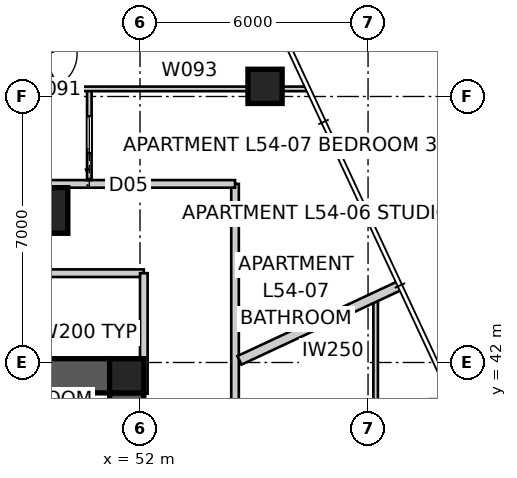
"""IFC4 building model, lengths in metres.
Left out: names, types, materials, properties, quantities, classifications, styles, units other than length and angle.
Written with IfcOpenShell. Run it as: python <this file> out.ifc"""

import sys

from ifc_helpers import new_model, si_unit, direction, frame, frame_2d, origin, origin_2d, place, context, subcontext, project, spatial, polyline, rectangle, outline, extrude, element, fill, save


model = new_model("IFC4")
c1 = context("Model", 3, precision=1e-05, world=origin(), true_north=direction((0.0, 1.0)))
c2 = subcontext(c1, "Body", "Model", "MODEL_VIEW")
j1 = project(units=[si_unit("LENGTHUNIT", "METRE"), si_unit("PLANEANGLEUNIT", "RADIAN")], contexts=[c1])
p1 = place(None, origin())
s1 = spatial("IfcSite", under=j1, at=p1, CompositionType="ELEMENT")
p2 = place(p1, origin())
s2 = spatial("IfcBuilding", under=s1, at=p2, CompositionType="ELEMENT")
p3 = place(p2, frame((0.0, 0.0, 196.4)))
s3 = spatial("IfcBuildingStorey", under=s2, at=p3, CompositionType="ELEMENT", Elevation=196.4)
p4 = place(p3, frame((28.8, 41.65, 0.0), z_axis=(0.0, 0.0, 1.0), x_axis=(1.0, 0.0, 0.0)))
e1 = element("IfcWall", 1, at=p4, inside=s3, PredefinedType="SHEAR", context=c2, shape_type="SweptSolid", body=[
    extrude(outline(polyline([(0.0, -0.45), (22.4, -0.45), (22.4, -0.025), (22.85, -0.025), (22.85, 0.025), (22.4, 0.025), (22.4, 0.45), (0.0, 0.45), (0.0, 0.025), (-0.45, 0.025), (-0.45, -0.025), (0.0, -0.025), (0.0, -0.45)])), origin(), (0.0, 0.0, 1.0), 3.4),
])
p5 = place(p3, frame((51.65, 18.8, 0.0), z_axis=(0.0, 0.0, 1.0), x_axis=(0.0, 1.0, 0.0)))
e2 = element("IfcWall", 2, at=p5, inside=s3, PredefinedType="SHEAR", context=c2, shape_type="SweptSolid", body=[
    extrude(outline(polyline([(0.0, -0.45), (22.4, -0.45), (22.4, -0.025), (22.85, -0.025), (22.85, 0.025), (22.4, 0.025), (22.4, 0.45), (0.0, 0.45), (0.0, 0.025), (-0.45, 0.025), (-0.45, -0.025), (0.0, -0.025), (0.0, -0.45)])), origin(), (0.0, 0.0, 1.0), 3.4),
])
p6 = place(p5, frame((11.14, 0.0, 0.0)))
e3 = element("IfcOpeningElement", 3, at=p6, cuts=e2, PredefinedType="OPENING", context=c2, shape_type="SweptSolid", body=[
    extrude(rectangle(XDim=1.02, YDim=2.4, at=frame_2d((0.51, 1.2))), frame((0.0, 0.46, 0.0), z_axis=(0.0, -1.0, 0.0), x_axis=(1.0, 0.0, 0.0)), (0.0, 0.0, 1.0), 0.92),
])
for number, where, z_axis, x_axis in (
    (4, (51.65, 41.65, 0.0), (0.0, 0.0, 1.0), (1.0, 0.0, 0.0)),
    (5, (55.29, 49.267, 0.0), (0.0, 0.0, 1.0), (1.0, 0.0, 0.0)),
):
    element("IfcColumn", number, at=place(p3, frame(where, z_axis=z_axis, x_axis=x_axis)), inside=s3, PredefinedType="COLUMN", context=c2, shape_type="SweptSolid", body=[
        extrude(rectangle(XDim=0.9, YDim=0.9, at=origin_2d()), origin(), (0.0, 0.0, 1.0), 3.4),
    ])
p7 = place(p3, frame((49.5, 46.0, 0.0), z_axis=(0.0, 0.0, 1.0), x_axis=(1.0, 0.0, 0.0)))
e6 = element("IfcColumn", 6, at=p7, inside=s3, PredefinedType="COLUMN", context=c2, shape_type="SweptSolid", body=[
    extrude(rectangle(XDim=1.2, YDim=1.2, at=origin_2d()), origin(), (0.0, 0.0, 1.0), 3.4),
])
p8 = place(p3, frame((54.5, 12.9, 0.0), z_axis=(0.0, 0.0, 1.0), x_axis=(0.0, 1.0, 0.0)))
e7 = element("IfcWall", 7, at=p8, inside=s3, PredefinedType="PARTITIONING", context=c2, shape_type="SweptSolid", body=[
    extrude(rectangle(XDim=33.8, YDim=0.2, at=frame_2d((16.9, 0.0))), origin(), (0.0, 0.0, 1.0), 3.25),
])
p9 = place(p8, frame((24.911, 0.0, 0.0)))
e8 = element("IfcOpeningElement", 8, at=p9, cuts=e7, PredefinedType="OPENING", context=c2, shape_type="SweptSolid", body=[
    extrude(rectangle(XDim=1.02, YDim=2.34, at=frame_2d((0.51, 1.17))), frame((0.0, 0.11, 0.0), z_axis=(0.0, -1.0, 0.0), x_axis=(1.0, 0.0, 0.0)), (0.0, 0.0, 1.0), 0.22),
])
p10 = place(p8, frame((14.759, 0.0, 0.0)))
e9 = element("IfcOpeningElement", 9, at=p10, cuts=e7, PredefinedType="OPENING", context=c2, shape_type="SweptSolid", body=[
    extrude(rectangle(XDim=1.02, YDim=2.34, at=frame_2d((0.51, 1.17))), frame((0.0, 0.11, 0.0), z_axis=(0.0, -1.0, 0.0), x_axis=(1.0, 0.0, 0.0)), (0.0, 0.0, 1.0), 0.22),
])
p11 = place(p3, frame((54.5, 46.7, 0.0), z_axis=(0.0, 0.0, 1.0), x_axis=(-1.0, 0.0, 0.0)))
e10 = element("IfcWall", 10, at=p11, inside=s3, PredefinedType="PARTITIONING", context=c2, shape_type="SweptSolid", body=[
    extrude(rectangle(XDim=6.725, YDim=0.2, at=frame_2d((3.362, 0.0))), origin(), (0.0, 0.0, 1.0), 3.25),
])
p12 = place(p3, frame((58.838, 44.025, 0.0), z_axis=(0.0, 0.0, 1.0), x_axis=(-0.906317010604, -0.422598481173, 0.0)))
e11 = element("IfcWall", 11, at=p12, inside=s3, PredefinedType="PARTITIONING", context=c2, shape_type="SweptSolid", body=[
    extrude(rectangle(XDim=4.657, YDim=0.25, at=frame_2d((2.329, 0.0))), origin(), (0.0, 0.0, 1.0), 3.25),
])
p13 = place(p3, frame((52.1, 44.35, 0.0), z_axis=(0.0, 0.0, 1.0), x_axis=(-1.0, 0.0, 0.0)))
e12 = element("IfcWall", 12, at=p13, inside=s3, PredefinedType="PARTITIONING", context=c2, shape_type="SweptSolid", body=[
    extrude(rectangle(XDim=24.2, YDim=0.2, at=frame_2d((12.1, 0.0))), origin(), (0.0, 0.0, 1.0), 3.25),
])
p14 = place(p13, frame((10.743, 0.0, 0.0)))
e13 = element("IfcOpeningElement", 13, at=p14, cuts=e12, PredefinedType="OPENING", context=c2, shape_type="SweptSolid", body=[
    extrude(rectangle(XDim=1.02, YDim=2.1, at=frame_2d((0.51, 1.05))), frame((0.0, 0.11, 0.0), z_axis=(0.0, -1.0, 0.0), x_axis=(1.0, 0.0, 0.0)), (0.0, 0.0, 1.0), 0.22),
])
p15 = place(p13, frame((19.636, 0.0, 0.0)))
e14 = element("IfcOpeningElement", 14, at=p15, cuts=e12, PredefinedType="OPENING", context=c2, shape_type="SweptSolid", body=[
    extrude(rectangle(XDim=1.02, YDim=2.1, at=frame_2d((0.51, 1.05))), frame((0.0, 0.11, 0.0), z_axis=(0.0, -1.0, 0.0), x_axis=(1.0, 0.0, 0.0)), (0.0, 0.0, 1.0), 0.22),
])
p16 = place(p13, frame((3.297, 0.0, 0.0)))
e15 = element("IfcOpeningElement", 15, at=p16, cuts=e12, PredefinedType="OPENING", context=c2, shape_type="SweptSolid", body=[
    extrude(rectangle(XDim=1.02, YDim=2.1, at=frame_2d((0.51, 1.05))), frame((0.0, 0.11, 0.0), z_axis=(0.0, -1.0, 0.0), x_axis=(1.0, 0.0, 0.0)), (0.0, 0.0, 1.0), 0.22),
])
p17 = place(p3, frame((52.1, 41.18, 0.0), z_axis=(0.0, 0.0, 1.0), x_axis=(0.0, 1.0, 0.0)))
e16 = element("IfcWall", 16, at=p17, inside=s3, PredefinedType="PARTITIONING", context=c2, shape_type="SweptSolid", body=[
    extrude(rectangle(XDim=3.17, YDim=0.2, at=frame_2d((1.585, 0.0))), origin(), (0.0, 0.0, 1.0), 3.25),
])
p18 = place(p3, frame((58.2, 43.728, 0.0), z_axis=(0.0, 0.0, 1.0), x_axis=(0.0, -1.0, 0.0)))
e17 = element("IfcWall", 17, at=p18, inside=s3, PredefinedType="PARTITIONING", context=c2, shape_type="SweptSolid", body=[
    extrude(rectangle(XDim=16.528, YDim=0.12, at=frame_2d((8.264, 0.0))), origin(), (0.0, 0.0, 1.0), 3.25),
])
p19 = place(p18, frame((4.954, 0.0, 0.0)))
e18 = element("IfcOpeningElement", 18, at=p19, cuts=e17, PredefinedType="OPENING", context=c2, shape_type="SweptSolid", body=[
    extrude(rectangle(XDim=0.92, YDim=2.34, at=frame_2d((0.46, 1.17))), frame((0.0, 0.07, 0.0), z_axis=(0.0, -1.0, 0.0), x_axis=(1.0, 0.0, 0.0)), (0.0, 0.0, 1.0), 0.14),
])
p20 = place(p18, frame((14.2, 0.0, 0.0)))
e19 = element("IfcOpeningElement", 19, at=p20, cuts=e17, PredefinedType="OPENING", context=c2, shape_type="SweptSolid", body=[
    extrude(rectangle(XDim=0.92, YDim=2.34, at=frame_2d((0.46, 1.17))), frame((0.0, 0.07, 0.0), z_axis=(0.0, -1.0, 0.0), x_axis=(1.0, 0.0, 0.0)), (0.0, 0.0, 1.0), 0.14),
])
p21 = place(p3, frame((50.666, 46.8, 0.0), z_axis=(0.0, 0.0, 1.0), x_axis=(0.0, 1.0, 0.0)))
e20 = element("IfcWall", 20, at=p21, inside=s3, PredefinedType="PARTITIONING", context=c2, shape_type="SweptSolid", body=[
    extrude(rectangle(XDim=2.4, YDim=0.12, at=frame_2d((1.2, 0.0))), origin(), (0.0, 0.0, 1.0), 3.25),
])
p22 = place(p21, frame((0.72, 0.0, 0.0)))
e21 = element("IfcOpeningElement", 21, at=p22, cuts=e20, PredefinedType="OPENING", context=c2, shape_type="SweptSolid", body=[
    extrude(rectangle(XDim=0.96, YDim=2.1, at=frame_2d((0.48, 1.05))), frame((0.0, 0.07, 0.0), z_axis=(0.0, -1.0, 0.0), x_axis=(1.0, 0.0, 0.0)), (0.0, 0.0, 1.0), 0.14),
])
p23 = place(p3, frame((54.787, 52.618, 0.0), z_axis=(0.0, 0.0, 1.0), x_axis=(-0.906311876708, -0.422609491301, 0.0)))
e22 = element("IfcWall", 22, at=p23, inside=s3, PredefinedType="PARTITIONING", context=c2, shape_type="SweptSolid", body=[
    extrude(rectangle(XDim=8.088, YDim=0.12, at=frame_2d((4.044, 0.0))), origin(), (0.0, 0.0, 1.0), 3.25),
])
p24 = place(p23, frame((4.997, 0.0, 0.0)))
e23 = element("IfcOpeningElement", 23, at=p24, cuts=e22, PredefinedType="OPENING", context=c2, shape_type="SweptSolid", body=[
    extrude(rectangle(XDim=0.92, YDim=2.34, at=frame_2d((0.46, 1.17))), frame((0.0, 0.07, 0.0), z_axis=(0.0, -1.0, 0.0), x_axis=(1.0, 0.0, 0.0)), (0.0, 0.0, 1.0), 0.14),
])
p25 = place(p3, frame((31.047, 49.2, 0.0), z_axis=(0.0, 0.0, 1.0), x_axis=(1.0, 0.0, 0.0)))
e24 = element("IfcWall", 24, at=p25, inside=s3, PredefinedType="PARTITIONING", context=c2, shape_type="SweptSolid", body=[
    extrude(rectangle(XDim=25.333, YDim=0.12, at=frame_2d((12.667, 0.0))), origin(), (0.0, 0.0, 1.0), 3.25),
])
p26 = place(p25, frame((14.154, 0.0, 0.0)))
e25 = element("IfcOpeningElement", 25, at=p26, cuts=e24, PredefinedType="OPENING", context=c2, shape_type="SweptSolid", body=[
    extrude(rectangle(XDim=0.92, YDim=2.34, at=frame_2d((0.46, 1.17))), frame((0.0, 0.07, 0.0), z_axis=(0.0, -1.0, 0.0), x_axis=(1.0, 0.0, 0.0)), (0.0, 0.0, 1.0), 0.14),
])
p27 = place(p25, frame((10.24, 0.0, 0.0)))
e26 = element("IfcOpeningElement", 26, at=p27, cuts=e24, PredefinedType="OPENING", context=c2, shape_type="SweptSolid", body=[
    extrude(rectangle(XDim=0.96, YDim=2.1, at=frame_2d((0.48, 1.05))), frame((0.0, 0.07, 0.0), z_axis=(0.0, -1.0, 0.0), x_axis=(1.0, 0.0, 0.0)), (0.0, 0.0, 1.0), 0.14),
])
p28 = place(p25, frame((6.596, 0.0, 0.0)))
e27 = element("IfcOpeningElement", 27, at=p28, cuts=e24, PredefinedType="OPENING", context=c2, shape_type="SweptSolid", body=[
    extrude(rectangle(XDim=0.92, YDim=2.34, at=frame_2d((0.46, 1.17))), frame((0.0, 0.07, 0.0), z_axis=(0.0, -1.0, 0.0), x_axis=(1.0, 0.0, 0.0)), (0.0, 0.0, 1.0), 0.14),
])
p29 = place(p25, frame((2.19, 0.0, 0.0)))
e28 = element("IfcOpeningElement", 28, at=p29, cuts=e24, PredefinedType="OPENING", context=c2, shape_type="SweptSolid", body=[
    extrude(rectangle(XDim=0.96, YDim=2.1, at=frame_2d((0.48, 1.05))), frame((0.0, 0.07, 0.0), z_axis=(0.0, -1.0, 0.0), x_axis=(1.0, 0.0, 0.0)), (0.0, 0.0, 1.0), 0.14),
])
p30 = place(p22, origin())
e29 = element("IfcDoor", 29, at=p30, inside=s3, OperationType="SLIDING_TO_LEFT", PredefinedType="DOOR", context=c2, shape_type="SweptSolid", body=[
    extrude(rectangle(XDim=0.96, YDim=2.1, at=frame_2d((0.48, 1.05))), frame((0.0, 0.025, 0.0), z_axis=(0.0, -1.0, 0.0), x_axis=(1.0, 0.0, 0.0)), (0.0, 0.0, 1.0), 0.05),
])
fill(e21, e29)
p31 = place(p24, origin())
e30 = element("IfcDoor", 30, at=p31, inside=s3, OperationType="SINGLE_SWING_RIGHT", PredefinedType="DOOR", context=c2, shape_type="SweptSolid", body=[
    extrude(rectangle(XDim=0.92, YDim=2.34, at=frame_2d((0.46, 1.17))), frame((0.0, 0.025, 0.0), z_axis=(0.0, -1.0, 0.0), x_axis=(1.0, 0.0, 0.0)), (0.0, 0.0, 1.0), 0.05),
])
fill(e23, e30)
save(model, sys.argv[1])
